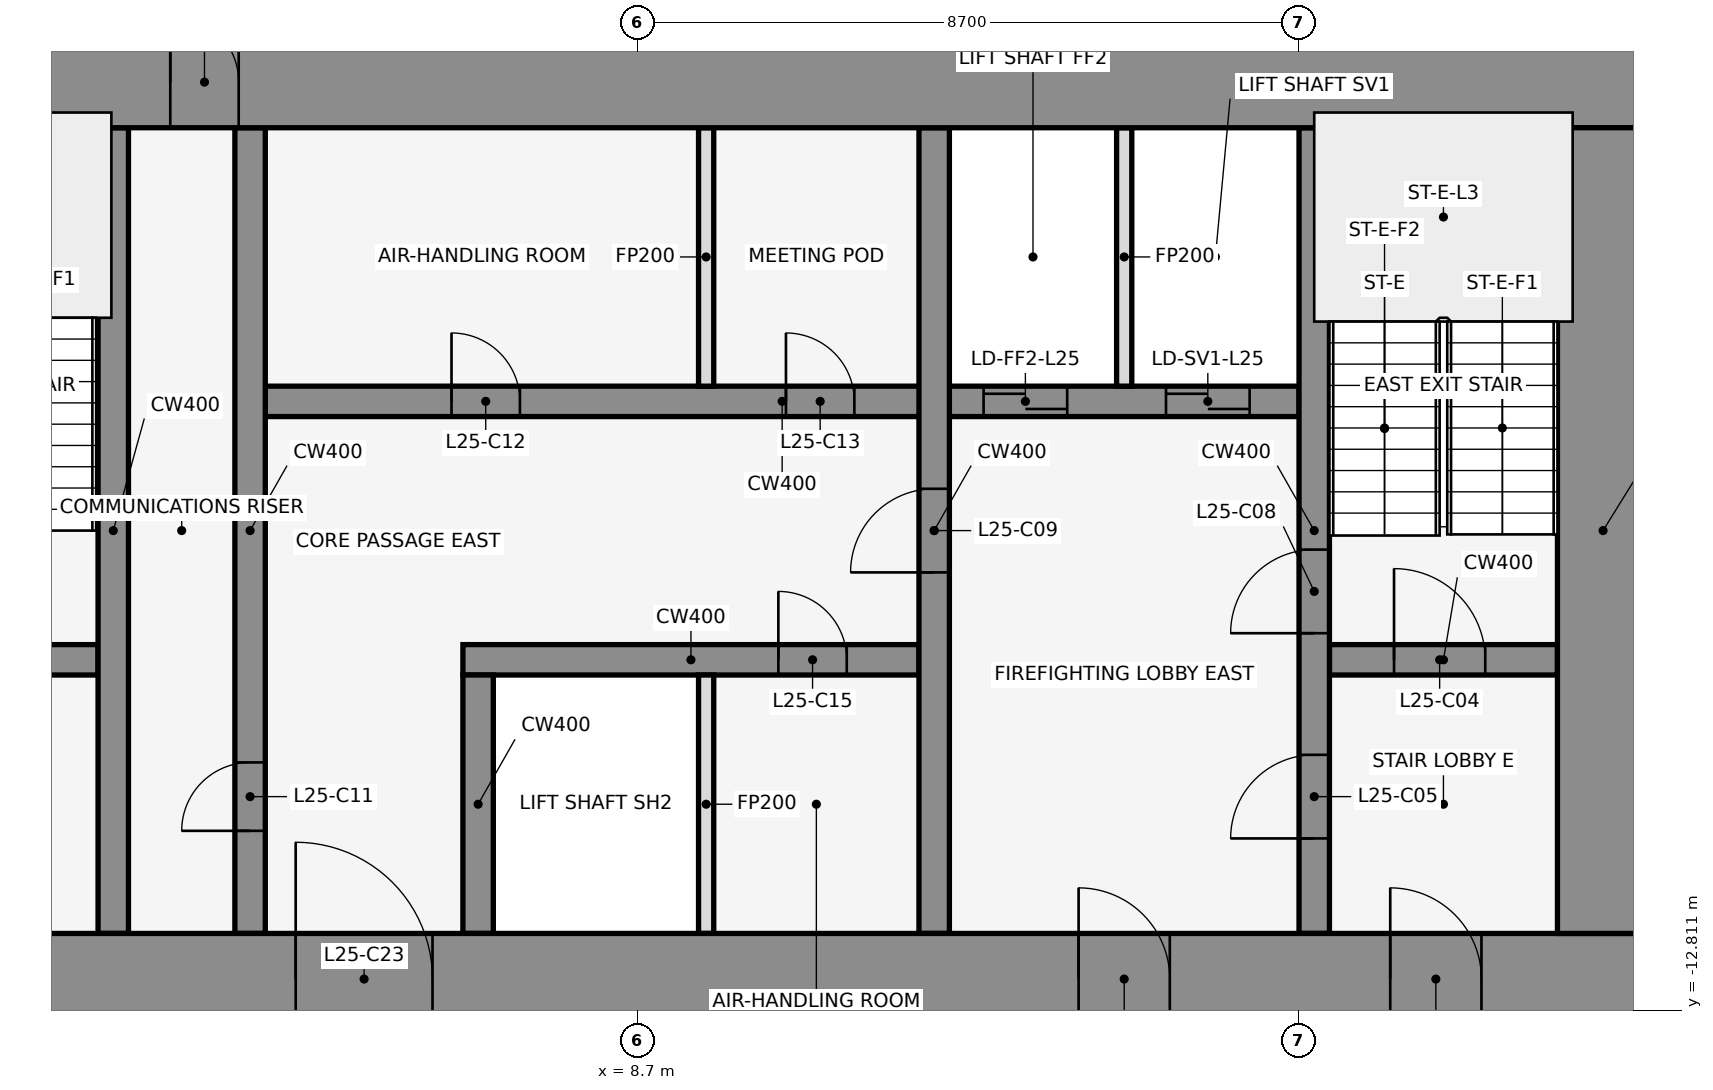
"""IFC4 building model, lengths in metres.
Left out: names, types, materials, properties, quantities, classifications, styles, units other than length and angle.
Written with IfcOpenShell. Run it as: python <this file> out.ifc"""

import sys

from ifc_helpers import new_model, si_unit, direction, frame, frame_2d, origin, place, context, subcontext, project, spatial, rectangle, extrude, element, fill, save


model = new_model("IFC4")
c1 = context("Model", 3, precision=1e-05, world=origin(), true_north=direction((0.0, 1.0)))
c2 = subcontext(c1, "Body", "Model", "MODEL_VIEW")
j1 = project(units=[si_unit("LENGTHUNIT", "METRE"), si_unit("PLANEANGLEUNIT", "RADIAN")], contexts=[c1])
p1 = place(None, origin())
s1 = spatial("IfcSite", under=j1, at=p1, CompositionType="ELEMENT")
p2 = place(p1, origin())
s2 = spatial("IfcBuilding", under=s1, at=p2, CompositionType="ELEMENT")
p3 = place(p2, frame((0.0, 0.0, 118.6)))
s3 = spatial("IfcBuildingStorey", under=s2, at=p3, CompositionType="ELEMENT", Elevation=118.6)
for number, where, z_axis, x_axis in (
    (1, (16.432, -0.105, 0.0), (0.0, 0.0, 1.0), (-0.84, 0.543, 0.0)),
    (2, (1.901, 1.08, 0.0), (0.0, 0.0, 1.0), (-0.84, -0.543, 0.0)),
):
    element("IfcWall", number, at=place(p3, frame(where, z_axis=z_axis, x_axis=x_axis)), inside=s3, PredefinedType="STANDARD", context=c2, shape_type="SweptSolid", body=[
        extrude(rectangle(XDim=2.183, YDim=0.25, at=frame_2d((1.091, 0.0))), origin(), (0.0, 0.0, 1.0), 3.95),
    ])
p4 = place(p3, frame((-1.6, -8.2, 0.0), z_axis=(0.0, 0.0, 1.0), x_axis=(1.0, 0.0, 0.0)))
e3 = element("IfcWall", 3, at=p4, inside=s3, PredefinedType="SHEAR", context=c2, shape_type="SweptSolid", body=[
    extrude(rectangle(XDim=3.2, YDim=0.4, at=frame_2d((1.6, 0.0))), origin(), (0.0, 0.0, 1.0), 4.1),
])
p5 = place(p4, frame((1.05, 0.0, 0.0)))
e4 = element("IfcOpeningElement", 4, at=p5, cuts=e3, PredefinedType="OPENING", context=c2, shape_type="SweptSolid", body=[
    extrude(rectangle(XDim=1.2, YDim=2.1, at=frame_2d((0.6, 1.05))), frame((0.0, 0.212, 0.0), z_axis=(0.0, -1.0, 0.0), x_axis=(1.0, 0.0, 0.0)), (0.0, 0.0, 1.0), 0.424),
])
p6 = place(p3, frame((6.4, -8.2, 0.0), z_axis=(0.0, 0.0, 1.0), x_axis=(1.0, 0.0, 0.0)))
e5 = element("IfcWall", 5, at=p6, inside=s3, PredefinedType="SHEAR", context=c2, shape_type="SweptSolid", body=[
    extrude(rectangle(XDim=6.0, YDim=0.4, at=frame_2d((3.0, 0.0))), origin(), (0.0, 0.0, 1.0), 4.1),
])
p7 = place(p6, frame((4.15, 0.0, 0.0)))
e6 = element("IfcOpeningElement", 6, at=p7, cuts=e5, PredefinedType="OPENING", context=c2, shape_type="SweptSolid", body=[
    extrude(rectangle(XDim=0.9, YDim=2.1, at=frame_2d((0.45, 1.05))), frame((0.0, 0.212, 0.0), z_axis=(0.0, -1.0, 0.0), x_axis=(1.0, 0.0, 0.0)), (0.0, 0.0, 1.0), 0.424),
])
p8 = place(p3, frame((17.8, -8.2, 0.0), z_axis=(0.0, 0.0, 1.0), x_axis=(1.0, 0.0, 0.0)))
e7 = element("IfcWall", 7, at=p8, inside=s3, PredefinedType="SHEAR", context=c2, shape_type="SweptSolid", body=[
    extrude(rectangle(XDim=3.0, YDim=0.4, at=frame_2d((1.5, 0.0))), origin(), (0.0, 0.0, 1.0), 4.1),
])
p9 = place(p8, frame((0.85, 0.0, 0.0)))
e8 = element("IfcOpeningElement", 8, at=p9, cuts=e7, PredefinedType="OPENING", context=c2, shape_type="SweptSolid", body=[
    extrude(rectangle(XDim=1.2, YDim=2.1, at=frame_2d((0.6, 1.05))), frame((0.0, 0.212, 0.0), z_axis=(0.0, -1.0, 0.0), x_axis=(1.0, 0.0, 0.0)), (0.0, 0.0, 1.0), 0.424),
])
p10 = place(p3, frame((3.8, -4.8, 0.0), z_axis=(0.0, 0.0, 1.0), x_axis=(1.0, 0.0, 0.0)))
e9 = element("IfcWall", 9, at=p10, inside=s3, PredefinedType="SHEAR", context=c2, shape_type="SweptSolid", body=[
    extrude(rectangle(XDim=13.6, YDim=0.4, at=frame_2d((6.8, 0.0))), origin(), (0.0, 0.0, 1.0), 4.1),
])
p11 = place(p10, frame((9.45, 0.0, 0.0)))
e10 = element("IfcOpeningElement", 10, at=p11, cuts=e9, PredefinedType="OPENING", context=c2, shape_type="SweptSolid", body=[
    extrude(rectangle(XDim=1.1, YDim=2.1, at=frame_2d((0.55, 1.05))), frame((0.0, 0.212, 0.0), z_axis=(0.0, -1.0, 0.0), x_axis=(1.0, 0.0, 0.0)), (0.0, 0.0, 1.0), 0.424),
])
p12 = place(p10, frame((11.85, 0.0, 0.0)))
e11 = element("IfcOpeningElement", 11, at=p12, cuts=e9, PredefinedType="OPENING", context=c2, shape_type="SweptSolid", body=[
    extrude(rectangle(XDim=1.1, YDim=2.1, at=frame_2d((0.55, 1.05))), frame((0.0, 0.212, 0.0), z_axis=(0.0, -1.0, 0.0), x_axis=(1.0, 0.0, 0.0)), (0.0, 0.0, 1.0), 0.424),
])
p13 = place(p10, frame((2.45, 0.0, 0.0)))
e12 = element("IfcOpeningElement", 12, at=p13, cuts=e9, PredefinedType="OPENING", context=c2, shape_type="SweptSolid", body=[
    extrude(rectangle(XDim=0.9, YDim=2.1, at=frame_2d((0.45, 1.05))), frame((0.0, 0.212, 0.0), z_axis=(0.0, -1.0, 0.0), x_axis=(1.0, 0.0, 0.0)), (0.0, 0.0, 1.0), 0.424),
])
p14 = place(p10, frame((6.85, 0.0, 0.0)))
e13 = element("IfcOpeningElement", 13, at=p14, cuts=e9, PredefinedType="OPENING", context=c2, shape_type="SweptSolid", body=[
    extrude(rectangle(XDim=0.9, YDim=2.1, at=frame_2d((0.45, 1.05))), frame((0.0, 0.212, 0.0), z_axis=(0.0, -1.0, 0.0), x_axis=(1.0, 0.0, 0.0)), (0.0, 0.0, 1.0), 0.424),
])
p15 = place(p3, frame((1.8, -11.8, 0.0), z_axis=(0.0, 0.0, 1.0), x_axis=(0.0, 1.0, 0.0)))
e14 = element("IfcWall", 14, at=p15, inside=s3, PredefinedType="SHEAR", context=c2, shape_type="SweptSolid", body=[
    extrude(rectangle(XDim=10.6, YDim=0.4, at=frame_2d((5.3, 0.0))), origin(), (0.0, 0.0, 1.0), 4.1),
])
p16 = place(p3, frame((3.6, -11.8, 0.0), z_axis=(0.0, 0.0, 1.0), x_axis=(0.0, 1.0, 0.0)))
e15 = element("IfcWall", 15, at=p16, inside=s3, PredefinedType="SHEAR", context=c2, shape_type="SweptSolid", body=[
    extrude(rectangle(XDim=10.6, YDim=0.4, at=frame_2d((5.3, 0.0))), origin(), (0.0, 0.0, 1.0), 4.1),
])
p17 = place(p16, frame((1.35, 0.0, 0.0)))
e16 = element("IfcOpeningElement", 16, at=p17, cuts=e15, PredefinedType="OPENING", context=c2, shape_type="SweptSolid", body=[
    extrude(rectangle(XDim=0.9, YDim=2.1, at=frame_2d((0.45, 1.05))), frame((0.0, 0.212, 0.0), z_axis=(0.0, -1.0, 0.0), x_axis=(1.0, 0.0, 0.0)), (0.0, 0.0, 1.0), 0.424),
])
p18 = place(p3, frame((6.6, -11.8, 0.0), z_axis=(0.0, 0.0, 1.0), x_axis=(0.0, 1.0, 0.0)))
e17 = element("IfcWall", 17, at=p18, inside=s3, PredefinedType="SHEAR", context=c2, shape_type="SweptSolid", body=[
    extrude(rectangle(XDim=3.4, YDim=0.4, at=frame_2d((1.7, 0.0))), origin(), (0.0, 0.0, 1.0), 4.1),
])
for number, where, z_axis, x_axis in (
    (18, (9.6, -11.8, 0.0), (0.0, 0.0, 1.0), (0.0, 1.0, 0.0)),
    (19, (9.6, -4.6, 0.0), (0.0, 0.0, 1.0), (0.0, 1.0, 0.0)),
):
    element("IfcWall", number, at=place(p3, frame(where, z_axis=z_axis, x_axis=x_axis)), inside=s3, PredefinedType="PARTITIONING", context=c2, shape_type="SweptSolid", body=[
        extrude(rectangle(XDim=3.4, YDim=0.2, at=frame_2d((1.7, 0.0))), origin(), (0.0, 0.0, 1.0), 3.018),
    ])
p19 = place(p3, frame((12.6, -11.8, 0.0), z_axis=(0.0, 0.0, 1.0), x_axis=(0.0, 1.0, 0.0)))
e20 = element("IfcWall", 20, at=p19, inside=s3, PredefinedType="SHEAR", context=c2, shape_type="SweptSolid", body=[
    extrude(rectangle(XDim=10.6, YDim=0.4, at=frame_2d((5.3, 0.0))), origin(), (0.0, 0.0, 1.0), 4.1),
])
p20 = place(p19, frame((4.75, 0.0, 0.0)))
e21 = element("IfcOpeningElement", 21, at=p20, cuts=e20, PredefinedType="OPENING", context=c2, shape_type="SweptSolid", body=[
    extrude(rectangle(XDim=1.1, YDim=2.1, at=frame_2d((0.55, 1.05))), frame((0.0, 0.212, 0.0), z_axis=(0.0, -1.0, 0.0), x_axis=(1.0, 0.0, 0.0)), (0.0, 0.0, 1.0), 0.424),
])
p21 = place(p3, frame((15.1, -4.6, 0.0), z_axis=(0.0, 0.0, 1.0), x_axis=(0.0, 1.0, 0.0)))
e22 = element("IfcWall", 22, at=p21, inside=s3, PredefinedType="PARTITIONING", context=c2, shape_type="SweptSolid", body=[
    extrude(rectangle(XDim=3.4, YDim=0.2, at=frame_2d((1.7, 0.0))), origin(), (0.0, 0.0, 1.0), 3.018),
])
p22 = place(p3, frame((17.6, -11.8, 0.0), z_axis=(0.0, 0.0, 1.0), x_axis=(0.0, 1.0, 0.0)))
e23 = element("IfcWall", 23, at=p22, inside=s3, PredefinedType="SHEAR", context=c2, shape_type="SweptSolid", body=[
    extrude(rectangle(XDim=10.6, YDim=0.4, at=frame_2d((5.3, 0.0))), origin(), (0.0, 0.0, 1.0), 4.1),
])
p23 = place(p22, frame((1.25, 0.0, 0.0)))
e24 = element("IfcOpeningElement", 24, at=p23, cuts=e23, PredefinedType="OPENING", context=c2, shape_type="SweptSolid", body=[
    extrude(rectangle(XDim=1.1, YDim=2.1, at=frame_2d((0.55, 1.05))), frame((0.0, 0.212, 0.0), z_axis=(0.0, -1.0, 0.0), x_axis=(1.0, 0.0, 0.0)), (0.0, 0.0, 1.0), 0.424),
])
p24 = place(p22, frame((3.95, 0.0, 0.0)))
e25 = element("IfcOpeningElement", 25, at=p24, cuts=e23, PredefinedType="OPENING", context=c2, shape_type="SweptSolid", body=[
    extrude(rectangle(XDim=1.1, YDim=2.1, at=frame_2d((0.55, 1.05))), frame((0.0, 0.212, 0.0), z_axis=(0.0, -1.0, 0.0), x_axis=(1.0, 0.0, 0.0)), (0.0, 0.0, 1.0), 0.424),
])
p25 = place(p3, frame((-22.0, -0.6, 0.0), z_axis=(0.0, 0.0, 1.0), x_axis=(1.0, 0.0, 0.0)))
e26 = element("IfcWall", 26, at=p25, inside=s3, PredefinedType="SHEAR", context=c2, shape_type="SweptSolid", body=[
    extrude(rectangle(XDim=44.0, YDim=1.2, at=frame_2d((22.0, 0.0))), origin(), (0.0, 0.0, 1.0), 4.1),
])
p26 = place(p25, frame((18.55, 0.0, 0.0)))
e27 = element("IfcOpeningElement", 27, at=p26, cuts=e26, PredefinedType="OPENING", context=c2, shape_type="SweptSolid", body=[
    extrude(rectangle(XDim=0.9, YDim=2.1, at=frame_2d((0.45, 1.05))), frame((0.0, 0.612, 0.0), z_axis=(0.0, -1.0, 0.0), x_axis=(1.0, 0.0, 0.0)), (0.0, 0.0, 1.0), 1.224),
])
p27 = place(p25, frame((24.55, 0.0, 0.0)))
e28 = element("IfcOpeningElement", 28, at=p27, cuts=e26, PredefinedType="OPENING", context=c2, shape_type="SweptSolid", body=[
    extrude(rectangle(XDim=0.9, YDim=2.1, at=frame_2d((0.45, 1.05))), frame((0.0, 0.612, 0.0), z_axis=(0.0, -1.0, 0.0), x_axis=(1.0, 0.0, 0.0)), (0.0, 0.0, 1.0), 1.224),
])
p28 = place(p3, frame((-22.0, -12.4, 0.0), z_axis=(0.0, 0.0, 1.0), x_axis=(1.0, 0.0, 0.0)))
e29 = element("IfcWall", 29, at=p28, inside=s3, PredefinedType="SHEAR", context=c2, shape_type="SweptSolid", body=[
    extrude(rectangle(XDim=44.0, YDim=1.2, at=frame_2d((22.0, 0.0))), origin(), (0.0, 0.0, 1.0), 4.1),
])
p29 = place(p28, frame((2.2, 0.0, 0.0)))
e30 = element("IfcOpeningElement", 30, at=p29, cuts=e29, PredefinedType="OPENING", context=c2, shape_type="SweptSolid", body=[
    extrude(rectangle(XDim=1.2, YDim=2.1, at=frame_2d((0.6, 1.05))), frame((0.0, 0.612, 0.0), z_axis=(0.0, -1.0, 0.0), x_axis=(1.0, 0.0, 0.0)), (0.0, 0.0, 1.0), 1.224),
])
p30 = place(p28, frame((21.4, 0.0, 0.0)))
e31 = element("IfcOpeningElement", 31, at=p30, cuts=e29, PredefinedType="OPENING", context=c2, shape_type="SweptSolid", body=[
    extrude(rectangle(XDim=1.2, YDim=2.1, at=frame_2d((0.6, 1.05))), frame((0.0, 0.612, 0.0), z_axis=(0.0, -1.0, 0.0), x_axis=(1.0, 0.0, 0.0)), (0.0, 0.0, 1.0), 1.224),
])
p31 = place(p28, frame((40.6, 0.0, 0.0)))
e32 = element("IfcOpeningElement", 32, at=p31, cuts=e29, PredefinedType="OPENING", context=c2, shape_type="SweptSolid", body=[
    extrude(rectangle(XDim=1.2, YDim=2.1, at=frame_2d((0.6, 1.05))), frame((0.0, 0.612, 0.0), z_axis=(0.0, -1.0, 0.0), x_axis=(1.0, 0.0, 0.0)), (0.0, 0.0, 1.0), 1.224),
])
p32 = place(p28, frame((16.0, 0.0, 0.0)))
e33 = element("IfcOpeningElement", 33, at=p32, cuts=e29, PredefinedType="OPENING", context=c2, shape_type="SweptSolid", body=[
    extrude(rectangle(XDim=1.8, YDim=2.1, at=frame_2d((0.9, 1.05))), frame((0.0, 0.612, 0.0), z_axis=(0.0, -1.0, 0.0), x_axis=(1.0, 0.0, 0.0)), (0.0, 0.0, 1.0), 1.224),
])
p33 = place(p28, frame((6.3, 0.0, 0.0)))
e34 = element("IfcOpeningElement", 34, at=p33, cuts=e29, PredefinedType="OPENING", context=c2, shape_type="SweptSolid", body=[
    extrude(rectangle(XDim=1.2, YDim=2.1, at=frame_2d((0.6, 1.05))), frame((0.0, 0.612, 0.0), z_axis=(0.0, -1.0, 0.0), x_axis=(1.0, 0.0, 0.0)), (0.0, 0.0, 1.0), 1.224),
])
p34 = place(p28, frame((26.2, 0.0, 0.0)))
e35 = element("IfcOpeningElement", 35, at=p34, cuts=e29, PredefinedType="OPENING", context=c2, shape_type="SweptSolid", body=[
    extrude(rectangle(XDim=1.8, YDim=2.1, at=frame_2d((0.9, 1.05))), frame((0.0, 0.612, 0.0), z_axis=(0.0, -1.0, 0.0), x_axis=(1.0, 0.0, 0.0)), (0.0, 0.0, 1.0), 1.224),
])
p35 = place(p28, frame((36.5, 0.0, 0.0)))
e36 = element("IfcOpeningElement", 36, at=p35, cuts=e29, PredefinedType="OPENING", context=c2, shape_type="SweptSolid", body=[
    extrude(rectangle(XDim=1.2, YDim=2.1, at=frame_2d((0.6, 1.05))), frame((0.0, 0.612, 0.0), z_axis=(0.0, -1.0, 0.0), x_axis=(1.0, 0.0, 0.0)), (0.0, 0.0, 1.0), 1.224),
])
p36 = place(p3, frame((21.4, -11.8, 0.0), z_axis=(0.0, 0.0, 1.0), x_axis=(0.0, 1.0, 0.0)))
e37 = element("IfcWall", 37, at=p36, inside=s3, PredefinedType="SHEAR", context=c2, shape_type="SweptSolid", body=[
    extrude(rectangle(XDim=10.6, YDim=1.2, at=frame_2d((5.3, 0.0))), origin(), (0.0, 0.0, 1.0), 4.1),
])
p37 = place(p9, origin())
e38 = element("IfcDoor", 38, at=p37, inside=s3, OperationType="SINGLE_SWING_RIGHT", PredefinedType="DOOR", context=c2, shape_type="SweptSolid", body=[
    extrude(rectangle(XDim=1.2, YDim=2.1, at=frame_2d((0.6, 1.05))), frame((0.0, 0.025, 0.0), z_axis=(0.0, -1.0, 0.0), x_axis=(1.0, 0.0, 0.0)), (0.0, 0.0, 1.0), 0.05),
])
fill(e8, e38)
p38 = place(p23, origin())
e39 = element("IfcDoor", 39, at=p38, inside=s3, OperationType="SINGLE_SWING_LEFT", PredefinedType="DOOR", context=c2, shape_type="SweptSolid", body=[
    extrude(rectangle(XDim=1.1, YDim=2.1, at=frame_2d((0.55, 1.05))), frame((0.0, 0.025, 0.0), z_axis=(0.0, -1.0, 0.0), x_axis=(1.0, 0.0, 0.0)), (0.0, 0.0, 1.0), 0.05),
])
fill(e24, e39)
p39 = place(p11, origin())
e40 = element("IfcDoor", 40, at=p39, inside=s3, OperationType="DOUBLE_DOOR_SLIDING", PredefinedType="DOOR", context=c2, shape_type="SweptSolid", body=[
    extrude(rectangle(XDim=1.1, YDim=2.1, at=frame_2d((0.55, 1.05))), frame((0.0, 0.025, 0.0), z_axis=(0.0, -1.0, 0.0), x_axis=(1.0, 0.0, 0.0)), (0.0, 0.0, 1.0), 0.05),
])
fill(e10, e40)
p40 = place(p12, origin())
e41 = element("IfcDoor", 41, at=p40, inside=s3, OperationType="DOUBLE_DOOR_SLIDING", PredefinedType="DOOR", context=c2, shape_type="SweptSolid", body=[
    extrude(rectangle(XDim=1.1, YDim=2.1, at=frame_2d((0.55, 1.05))), frame((0.0, 0.025, 0.0), z_axis=(0.0, -1.0, 0.0), x_axis=(1.0, 0.0, 0.0)), (0.0, 0.0, 1.0), 0.05),
])
fill(e11, e41)
p41 = place(p24, origin())
e42 = element("IfcDoor", 42, at=p41, inside=s3, OperationType="SINGLE_SWING_RIGHT", PredefinedType="DOOR", context=c2, shape_type="SweptSolid", body=[
    extrude(rectangle(XDim=1.1, YDim=2.1, at=frame_2d((0.55, 1.05))), frame((0.0, 0.025, 0.0), z_axis=(0.0, -1.0, 0.0), x_axis=(1.0, 0.0, 0.0)), (0.0, 0.0, 1.0), 0.05),
])
fill(e25, e42)
p42 = place(p20, frame((1.1, 0.0, 0.0), z_axis=(0.0, 0.0, 1.0), x_axis=(-1.0, 0.0, 0.0)))
e43 = element("IfcDoor", 43, at=p42, inside=s3, OperationType="SINGLE_SWING_RIGHT", PredefinedType="DOOR", context=c2, shape_type="SweptSolid", body=[
    extrude(rectangle(XDim=1.1, YDim=2.1, at=frame_2d((0.55, 1.05))), frame((0.0, 0.025, 0.0), z_axis=(0.0, -1.0, 0.0), x_axis=(1.0, 0.0, 0.0)), (0.0, 0.0, 1.0), 0.05),
])
fill(e21, e43)
p43 = place(p17, origin())
e44 = element("IfcDoor", 44, at=p43, inside=s3, OperationType="SINGLE_SWING_LEFT", PredefinedType="DOOR", context=c2, shape_type="SweptSolid", body=[
    extrude(rectangle(XDim=0.9, YDim=2.1, at=frame_2d((0.45, 1.05))), frame((0.0, 0.025, 0.0), z_axis=(0.0, -1.0, 0.0), x_axis=(1.0, 0.0, 0.0)), (0.0, 0.0, 1.0), 0.05),
])
fill(e16, e44)
p44 = place(p13, origin())
e45 = element("IfcDoor", 45, at=p44, inside=s3, OperationType="SINGLE_SWING_RIGHT", PredefinedType="DOOR", context=c2, shape_type="SweptSolid", body=[
    extrude(rectangle(XDim=0.9, YDim=2.1, at=frame_2d((0.45, 1.05))), frame((0.0, 0.025, 0.0), z_axis=(0.0, -1.0, 0.0), x_axis=(1.0, 0.0, 0.0)), (0.0, 0.0, 1.0), 0.05),
])
fill(e12, e45)
p45 = place(p14, origin())
e46 = element("IfcDoor", 46, at=p45, inside=s3, OperationType="SINGLE_SWING_LEFT", PredefinedType="DOOR", context=c2, shape_type="SweptSolid", body=[
    extrude(rectangle(XDim=0.9, YDim=2.1, at=frame_2d((0.45, 1.05))), frame((0.0, 0.025, 0.0), z_axis=(0.0, -1.0, 0.0), x_axis=(1.0, 0.0, 0.0)), (0.0, 0.0, 1.0), 0.05),
])
fill(e13, e46)
p46 = place(p7, frame((0.9, 0.0, 0.0), z_axis=(0.0, 0.0, 1.0), x_axis=(-1.0, 0.0, 0.0)))
e47 = element("IfcDoor", 47, at=p46, inside=s3, OperationType="SINGLE_SWING_RIGHT", PredefinedType="DOOR", context=c2, shape_type="SweptSolid", body=[
    extrude(rectangle(XDim=0.9, YDim=2.1, at=frame_2d((0.45, 1.05))), frame((0.0, 0.025, 0.0), z_axis=(0.0, -1.0, 0.0), x_axis=(1.0, 0.0, 0.0)), (0.0, 0.0, 1.0), 0.05),
])
fill(e6, e47)
p47 = place(p27, origin())
e48 = element("IfcDoor", 48, at=p47, inside=s3, OperationType="SINGLE_SWING_LEFT", PredefinedType="DOOR", context=c2, shape_type="SweptSolid", body=[
    extrude(rectangle(XDim=0.9, YDim=2.1, at=frame_2d((0.45, 1.05))), frame((0.0, 0.025, 0.0), z_axis=(0.0, -1.0, 0.0), x_axis=(1.0, 0.0, 0.0)), (0.0, 0.0, 1.0), 0.05),
])
fill(e28, e48)
p48 = place(p31, frame((1.2, 0.0, 0.0), z_axis=(0.0, 0.0, 1.0), x_axis=(-1.0, 0.0, 0.0)))
e49 = element("IfcDoor", 49, at=p48, inside=s3, OperationType="SINGLE_SWING_RIGHT", PredefinedType="DOOR", context=c2, shape_type="SweptSolid", body=[
    extrude(rectangle(XDim=1.2, YDim=2.1, at=frame_2d((0.6, 1.05))), frame((0.0, 0.025, 0.0), z_axis=(0.0, -1.0, 0.0), x_axis=(1.0, 0.0, 0.0)), (0.0, 0.0, 1.0), 0.05),
])
fill(e32, e49)
p49 = place(p34, origin())
e50 = element("IfcDoor", 50, at=p49, inside=s3, OperationType="SINGLE_SWING_LEFT", PredefinedType="DOOR", context=c2, shape_type="SweptSolid", body=[
    extrude(rectangle(XDim=1.8, YDim=2.1, at=frame_2d((0.9, 1.05))), frame((0.0, 0.025, 0.0), z_axis=(0.0, -1.0, 0.0), x_axis=(1.0, 0.0, 0.0)), (0.0, 0.0, 1.0), 0.05),
])
fill(e35, e50)
p50 = place(p35, frame((1.2, 0.0, 0.0), z_axis=(0.0, 0.0, 1.0), x_axis=(-1.0, 0.0, 0.0)))
e51 = element("IfcDoor", 51, at=p50, inside=s3, OperationType="SINGLE_SWING_RIGHT", PredefinedType="DOOR", context=c2, shape_type="SweptSolid", body=[
    extrude(rectangle(XDim=1.2, YDim=2.1, at=frame_2d((0.6, 1.05))), frame((0.0, 0.025, 0.0), z_axis=(0.0, -1.0, 0.0), x_axis=(1.0, 0.0, 0.0)), (0.0, 0.0, 1.0), 0.05),
])
fill(e36, e51)
save(model, sys.argv[1])
